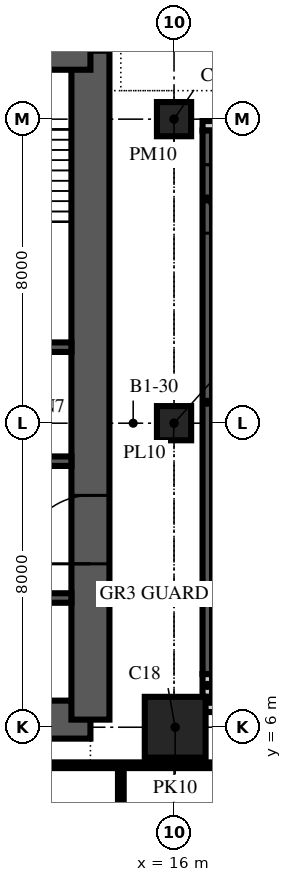
"""IFC4 building model, lengths in metres.
Left out: names, types, materials, properties, quantities, classifications, styles, units other than length and angle.
Written with IfcOpenShell. Run it as: python <this file> out.ifc"""

import sys

from ifc_helpers import new_model, si_unit, direction, frame, frame_2d, origin, origin_2d, place, context, subcontext, project, spatial, polyline, rectangle, outline, extrude, element, fill, save


model = new_model("IFC4")
c1 = context("Model", 3, precision=1e-05, world=origin(), true_north=direction((0.0, 1.0)))
c2 = subcontext(c1, "Body", "Model", "MODEL_VIEW")
j1 = project(units=[si_unit("LENGTHUNIT", "METRE"), si_unit("PLANEANGLEUNIT", "RADIAN")], contexts=[c1])
p1 = place(None, origin())
s1 = spatial("IfcSite", under=j1, at=p1, CompositionType="ELEMENT")
p2 = place(p1, origin())
s2 = spatial("IfcBuilding", under=s1, at=p2, CompositionType="ELEMENT")
p3 = place(p2, frame((0.0, 0.0, -7.0)))
s3 = spatial("IfcBuildingStorey", under=s2, at=p3, CompositionType="ELEMENT", Elevation=-7.0)
p4 = place(p3, frame((16.03, 6.0, -0.6), z_axis=(0.0, 0.0, 1.0), x_axis=(1.0, 0.0, 0.0)))
e1 = element("IfcColumn", 1, at=p4, inside=s3, PredefinedType="COLUMN", context=c2, shape_type="SweptSolid", body=[
    extrude(rectangle(XDim=1.6, YDim=1.6, at=origin_2d()), origin(), (0.0, 0.0, 1.0), 7.6),
])
for number, where, z_axis, x_axis in (
    (2, (16.0, 14.0, -0.6), (0.0, 0.0, 1.0), (1.0, 0.0, 0.0)),
    (3, (16.0, 22.0, -0.6), (0.0, 0.0, 1.0), (1.0, 0.0, 0.0)),
):
    element("IfcColumn", number, at=place(p3, frame(where, z_axis=z_axis, x_axis=x_axis)), inside=s3, PredefinedType="COLUMN", context=c2, shape_type="SweptSolid", body=[
        extrude(rectangle(XDim=0.9, YDim=0.9, at=origin_2d()), origin(), (0.0, 0.0, 1.0), 7.6),
    ])
p5 = place(p3, frame((-13.8, 6.2, 0.0), z_axis=(0.0, 0.0, 1.0), x_axis=(1.0, 0.0, 0.0)))
e4 = element("IfcWall", 4, at=p5, inside=s3, PredefinedType="SHEAR", context=c2, shape_type="SweptSolid", body=[
    extrude(rectangle(XDim=27.6, YDim=1.0, at=frame_2d((13.8, 0.0))), origin(), (0.0, 0.0, 1.0), 7.0),
])
p6 = place(p3, frame((13.8, 6.2, 0.0), z_axis=(0.0, 0.0, 1.0), x_axis=(0.0, 1.0, 0.0)))
e5 = element("IfcWall", 5, at=p6, inside=s3, PredefinedType="SHEAR", context=c2, shape_type="SweptSolid", body=[
    extrude(outline(polyline([(0.0, -0.5), (17.6, -0.5), (17.6, 0.0), (17.1, 0.0), (17.1, 0.5), (0.5, 0.5), (0.5, 0.0), (0.0, 0.0), (0.0, -0.5)])), origin(), (0.0, 0.0, 1.0), 7.0),
])
p7 = place(p6, frame((4.1, 0.0, 0.0)))
e6 = element("IfcOpeningElement", 6, at=p7, cuts=e5, PredefinedType="OPENING", context=c2, shape_type="SweptSolid", body=[
    extrude(rectangle(XDim=1.8, YDim=2.4, at=frame_2d((0.9, 1.2))), frame((0.0, 0.515, 0.0), z_axis=(0.0, -1.0, 0.0), x_axis=(1.0, 0.0, 0.0)), (0.0, 0.0, 1.0), 1.03),
])
p8 = place(p3, frame((13.8, 23.8, 0.0), z_axis=(0.0, 0.0, 1.0), x_axis=(-1.0, 0.0, 0.0)))
e7 = element("IfcWall", 7, at=p8, inside=s3, PredefinedType="SHEAR", context=c2, shape_type="SweptSolid", body=[
    extrude(rectangle(XDim=27.6, YDim=1.0, at=frame_2d((13.8, 0.0))), origin(), (0.0, 0.0, 1.0), 7.0),
])
p9 = place(p8, frame((21.7, 0.0, 0.0)))
e8 = element("IfcOpeningElement", 8, at=p9, cuts=e7, PredefinedType="OPENING", context=c2, shape_type="SweptSolid", body=[
    extrude(rectangle(XDim=1.0, YDim=2.1, at=frame_2d((0.5, 1.05))), frame((0.0, 0.515, 0.0), z_axis=(0.0, -1.0, 0.0), x_axis=(1.0, 0.0, 0.0)), (0.0, 0.0, 1.0), 1.03),
])
p10 = place(p8, frame((4.9, 0.0, 0.0)))
e9 = element("IfcOpeningElement", 9, at=p10, cuts=e7, PredefinedType="OPENING", context=c2, shape_type="SweptSolid", body=[
    extrude(rectangle(XDim=1.0, YDim=2.1, at=frame_2d((0.5, 1.05))), frame((0.0, 0.515, 0.0), z_axis=(0.0, -1.0, 0.0), x_axis=(1.0, 0.0, 0.0)), (0.0, 0.0, 1.0), 1.03),
])
p11 = place(p8, frame((17.3, 0.0, 0.0)))
e10 = element("IfcOpeningElement", 10, at=p11, cuts=e7, PredefinedType="OPENING", context=c2, shape_type="SweptSolid", body=[
    extrude(rectangle(XDim=1.0, YDim=2.1, at=frame_2d((0.5, 1.05))), frame((0.0, 0.515, 0.0), z_axis=(0.0, -1.0, 0.0), x_axis=(1.0, 0.0, 0.0)), (0.0, 0.0, 1.0), 1.03),
])
p12 = place(p8, frame((13.3, 0.0, 0.0)))
e11 = element("IfcOpeningElement", 11, at=p12, cuts=e7, PredefinedType="OPENING", context=c2, shape_type="SweptSolid", body=[
    extrude(rectangle(XDim=1.0, YDim=2.1, at=frame_2d((0.5, 1.05))), frame((0.0, 0.515, 0.0), z_axis=(0.0, -1.0, 0.0), x_axis=(1.0, 0.0, 0.0)), (0.0, 0.0, 1.0), 1.03),
])
p13 = place(p8, frame((9.3, 0.0, 0.0)))
e12 = element("IfcOpeningElement", 12, at=p13, cuts=e7, PredefinedType="OPENING", context=c2, shape_type="SweptSolid", body=[
    extrude(rectangle(XDim=1.0, YDim=2.1, at=frame_2d((0.5, 1.05))), frame((0.0, 0.515, 0.0), z_axis=(0.0, -1.0, 0.0), x_axis=(1.0, 0.0, 0.0)), (0.0, 0.0, 1.0), 1.03),
])
p14 = place(p3, frame((-13.3, 9.4, 0.0), z_axis=(0.0, 0.0, 1.0), x_axis=(1.0, 0.0, 0.0)))
e13 = element("IfcWall", 13, at=p14, inside=s3, PredefinedType="SHEAR", context=c2, shape_type="SweptSolid", body=[
    extrude(rectangle(XDim=26.6, YDim=0.25, at=frame_2d((13.3, 0.0))), origin(), (0.0, 0.0, 1.0), 7.0),
])
p15 = place(p3, frame((-13.3, 13.0, 0.0), z_axis=(0.0, 0.0, 1.0), x_axis=(1.0, 0.0, 0.0)))
e14 = element("IfcWall", 14, at=p15, inside=s3, PredefinedType="SHEAR", context=c2, shape_type="SweptSolid", body=[
    extrude(rectangle(XDim=26.6, YDim=0.25, at=frame_2d((13.3, 0.0))), origin(), (0.0, 0.0, 1.0), 7.0),
])
p16 = place(p15, frame((16.45, 0.0, 0.0)))
e15 = element("IfcOpeningElement", 15, at=p16, cuts=e14, PredefinedType="OPENING", context=c2, shape_type="SweptSolid", body=[
    extrude(rectangle(XDim=0.9, YDim=2.1, at=frame_2d((0.45, 1.05))), frame((0.0, 0.14, 0.0), z_axis=(0.0, -1.0, 0.0), x_axis=(1.0, 0.0, 0.0)), (0.0, 0.0, 1.0), 0.28),
])
p17 = place(p15, frame((20.85, 0.0, 0.0)))
e16 = element("IfcOpeningElement", 16, at=p17, cuts=e14, PredefinedType="OPENING", context=c2, shape_type="SweptSolid", body=[
    extrude(rectangle(XDim=0.9, YDim=2.1, at=frame_2d((0.45, 1.05))), frame((0.0, 0.14, 0.0), z_axis=(0.0, -1.0, 0.0), x_axis=(1.0, 0.0, 0.0)), (0.0, 0.0, 1.0), 0.28),
])
p18 = place(p3, frame((-13.3, 16.0, 0.0), z_axis=(0.0, 0.0, 1.0), x_axis=(1.0, 0.0, 0.0)))
e17 = element("IfcWall", 17, at=p18, inside=s3, PredefinedType="SHEAR", context=c2, shape_type="SweptSolid", body=[
    extrude(rectangle(XDim=26.6, YDim=0.25, at=frame_2d((13.3, 0.0))), origin(), (0.0, 0.0, 1.0), 7.0),
])
p19 = place(p3, frame((16.8, 6.525, 0.0), z_axis=(0.0, 0.0, 1.0), x_axis=(1.0, 0.0, 0.0)))
e18 = element("IfcWall", 18, at=p19, inside=s3, PredefinedType="SOLIDWALL", context=c2, shape_type="SweptSolid", body=[
    extrude(rectangle(XDim=6.35, YDim=0.25, at=frame_2d((3.175, 0.0))), origin(), (0.0, 0.0, 1.0), 6.05),
])
p20 = place(p3, frame((23.15, 21.825, 0.0), z_axis=(0.0, 0.0, 1.0), x_axis=(-1.0, 0.0, 0.0)))
e19 = element("IfcWall", 19, at=p20, inside=s3, PredefinedType="SOLIDWALL", context=c2, shape_type="SweptSolid", body=[
    extrude(rectangle(XDim=6.4, YDim=0.25, at=frame_2d((3.2, 0.0))), origin(), (0.0, 0.0, 1.0), 7.0),
])
p21 = place(p3, frame((16.875, 7.4, 0.0), z_axis=(0.0, 0.0, 1.0), x_axis=(0.0, -1.0, 0.0)))
e20 = element("IfcWall", 20, at=p21, inside=s3, PredefinedType="SOLIDWALL", context=c2, shape_type="SweptSolid", body=[
    extrude(rectangle(XDim=0.6, YDim=0.25, at=frame_2d((0.3, 0.0))), origin(), (0.0, 0.0, 1.0), 7.0),
])
p22 = place(p3, frame((16.875, 21.7, 0.0), z_axis=(0.0, 0.0, 1.0), x_axis=(0.0, -1.0, 0.0)))
e21 = element("IfcWall", 21, at=p22, inside=s3, PredefinedType="SOLIDWALL", context=c2, shape_type="SweptSolid", body=[
    extrude(rectangle(XDim=14.3, YDim=0.25, at=frame_2d((7.15, 0.0))), origin(), (0.0, 0.0, 1.0), 7.0),
])
p23 = place(p22, frame((0.9, 0.0, 0.0)))
e22 = element("IfcOpeningElement", 22, at=p23, cuts=e21, PredefinedType="OPENING", context=c2, shape_type="SweptSolid", body=[
    extrude(rectangle(XDim=1.8, YDim=2.1, at=frame_2d((0.9, 1.05))), frame((0.0, 0.14, 0.0), z_axis=(0.0, -1.0, 0.0), x_axis=(1.0, 0.0, 0.0)), (0.0, 0.0, 1.0), 0.28),
])
p24 = place(p3, frame((14.6, -4.44, 0.0), z_axis=(0.0, 0.0, 1.0), x_axis=(0.0, 1.0, 0.0)))
e23 = element("IfcWall", 23, at=p24, inside=s3, PredefinedType="PARTITIONING", context=c2, shape_type="SweptSolid", body=[
    extrude(rectangle(XDim=9.44, YDim=0.15, at=frame_2d((4.72, 0.0))), origin(), (0.0, 0.0, 1.0), 6.7),
])
p25 = place(p24, frame((4.22, 0.0, 0.0)))
e24 = element("IfcOpeningElement", 24, at=p25, cuts=e23, PredefinedType="OPENING", context=c2, shape_type="SweptSolid", body=[
    extrude(rectangle(XDim=1.0, YDim=2.1, at=frame_2d((0.5, 1.05))), frame((0.0, 0.09, 0.0), z_axis=(0.0, -1.0, 0.0), x_axis=(1.0, 0.0, 0.0)), (0.0, 0.0, 1.0), 0.18),
])
p26 = place(p24, frame((6.44, 0.0, 0.0)))
e25 = element("IfcOpeningElement", 25, at=p26, cuts=e23, PredefinedType="OPENING", context=c2, shape_type="SweptSolid", body=[
    extrude(rectangle(XDim=1.0, YDim=2.1, at=frame_2d((0.5, 1.05))), frame((0.0, 0.09, 0.0), z_axis=(0.0, -1.0, 0.0), x_axis=(1.0, 0.0, 0.0)), (0.0, 0.0, 1.0), 0.18),
])
p27 = place(p3, frame((-26.331, 5.0, 0.0), z_axis=(0.0, 0.0, 1.0), x_axis=(1.0, 0.0, 0.0)))
e26 = element("IfcWall", 26, at=p27, inside=s3, PredefinedType="PARTITIONING", context=c2, shape_type="SweptSolid", body=[
    extrude(rectangle(XDim=52.662, YDim=0.15, at=frame_2d((26.331, 0.0))), origin(), (0.0, 0.0, 1.0), 6.7),
])
p28 = place(p7, origin())
e27 = element("IfcDoor", 27, at=p28, inside=s3, OperationType="DOUBLE_DOOR_SINGLE_SWING", PredefinedType="DOOR", context=c2, shape_type="SweptSolid", body=[
    extrude(rectangle(XDim=1.8, YDim=2.4, at=frame_2d((0.9, 1.2))), frame((0.0, 0.5, 0.0), z_axis=(0.0, -1.0, 0.0), x_axis=(1.0, 0.0, 0.0)), (0.0, 0.0, 1.0), 1.0),
])
fill(e6, e27)
p29 = place(p23, origin())
e28 = element("IfcDoor", 28, at=p29, inside=s3, OperationType="DOUBLE_DOOR_SINGLE_SWING", PredefinedType="DOOR", context=c2, shape_type="SweptSolid", body=[
    extrude(rectangle(XDim=1.8, YDim=2.1, at=frame_2d((0.9, 1.05))), frame((0.0, 0.125, 0.0), z_axis=(0.0, -1.0, 0.0), x_axis=(1.0, 0.0, 0.0)), (0.0, 0.0, 1.0), 0.25),
])
fill(e22, e28)
save(model, sys.argv[1])
